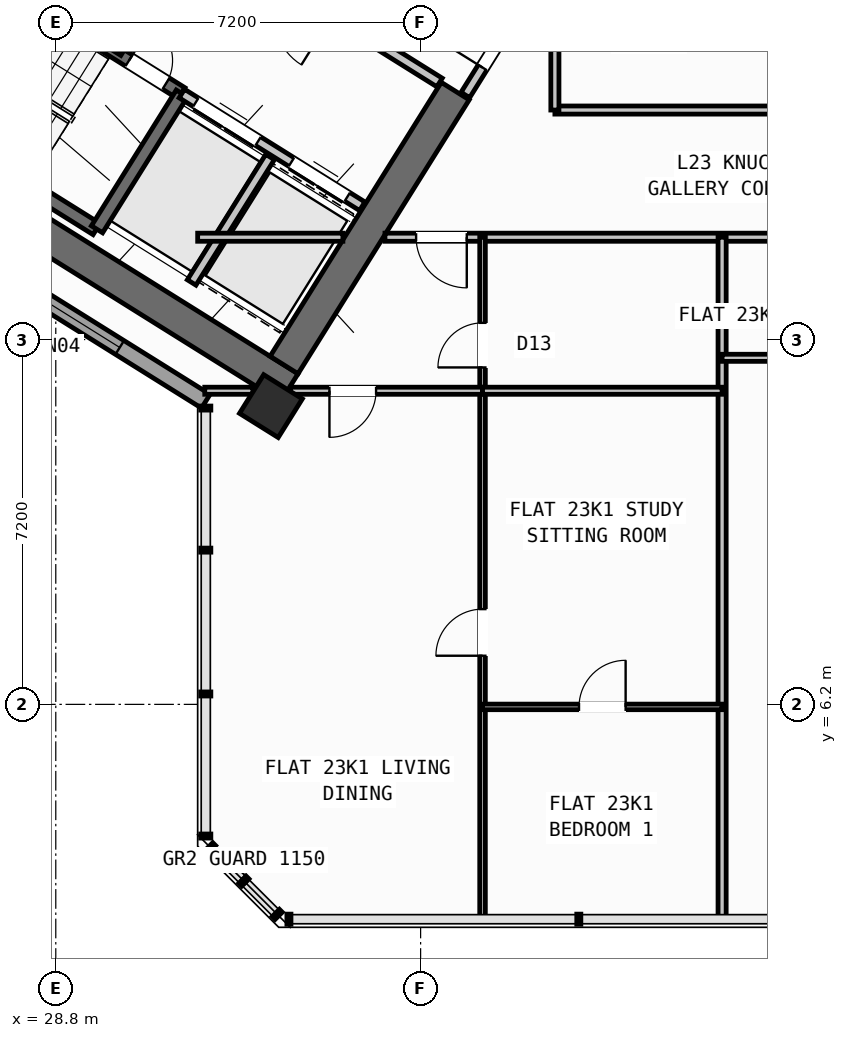
"""IFC4 building model, lengths in metres.
Left out: names, types, materials, properties, quantities, classifications, styles, units other than length and angle.
Written with IfcOpenShell. Run it as: python <this file> out.ifc"""

import sys

from ifc_helpers import new_model, si_unit, direction, frame, frame_2d, origin, origin_2d, place, context, subcontext, project, spatial, rectangle, hollow_rectangle, extrude, source, transform, mapped, element, fill, save


model = new_model("IFC4")
c1 = context("Model", 3, precision=1e-05, world=origin(), true_north=direction((0.0, 1.0)))
c2 = subcontext(c1, "Body", "Model", "MODEL_VIEW")
j1 = project(units=[si_unit("LENGTHUNIT", "METRE"), si_unit("PLANEANGLEUNIT", "RADIAN")], contexts=[c1])
p1 = place(None, origin())
s1 = spatial("IfcSite", under=j1, at=p1, CompositionType="ELEMENT")
p2 = place(p1, origin())
s2 = spatial("IfcBuilding", under=s1, at=p2, CompositionType="ELEMENT")
p3 = place(p2, frame((0.0, 0.0, 93.6)))
s3 = spatial("IfcBuildingStorey", under=s2, at=p3, CompositionType="ELEMENT", Elevation=93.6)
p4 = place(p3, frame((33.409, 12.45, 0.0), z_axis=(0.0, 0.0, 1.0), x_axis=(-0.848051132073, 0.529914405721, 0.0)))
e1 = element("IfcWall", 1, at=p4, inside=s3, PredefinedType="SHEAR", context=c2, shape_type="SweptSolid", body=[
    extrude(rectangle(XDim=13.24, YDim=0.65, at=frame_2d((6.62, 0.0))), origin(), (0.0, 0.0, 1.0), 3.35),
])
p5 = place(p3, frame((36.683, 18.304, 0.0), z_axis=(0.0, 0.0, 1.0), x_axis=(-0.529899109053, -0.848060690178, 0.0)))
e2 = element("IfcWall", 2, at=p5, inside=s3, PredefinedType="SHEAR", context=c2, shape_type="SweptSolid", body=[
    extrude(rectangle(XDim=6.375, YDim=0.65, at=frame_2d((3.188, 0.0))), origin(), (0.0, 0.0, 1.0), 3.35),
])
m1 = source(origin(), c2, "Body", "SweptSolid", [
    extrude(hollow_rectangle(XDim=0.9, YDim=0.9, WallThickness=0.036, at=origin_2d()), origin(), (0.0, 0.0, 1.0), 3.6),
])
p6 = place(p3, frame((33.046, 12.087, 0.0), z_axis=(0.0, 0.0, 1.0), x_axis=(-0.848048096156, 0.529919264233, 0.0)))
e3 = element("IfcColumn", 3, at=p6, inside=s3, PredefinedType="COLUMN", context=c2, shape_type="MappedRepresentation", body=[
    mapped(m1, transform((0.0, 0.0, 0.0), scale=1.0)),
])
p7 = place(p3, frame((31.76, 12.183, 0.0), z_axis=(0.0, 0.0, 1.0), x_axis=(-0.848047074256, 0.529920899612, 0.0)))
e4 = element("IfcWall", 4, at=p7, inside=s3, PredefinedType="STANDARD", context=c2, shape_type="SweptSolid", body=[
    extrude(rectangle(XDim=30.652, YDim=0.32, at=frame_2d((15.326, 0.0))), origin(), (0.0, 0.0, 1.0), 3.35),
])
p8 = place(p7, frame((15.153, 0.0, 0.0)))
e5 = element("IfcOpeningElement", 5, at=p8, cuts=e4, PredefinedType="OPENING", context=c2, shape_type="SweptSolid", body=[
    extrude(rectangle(XDim=1.2, YDim=2.15, at=frame_2d((0.6, 1.075))), frame((0.0, 0.17, 0.0), z_axis=(0.0, -1.0, 0.0), x_axis=(1.0, 0.0, 0.0)), (0.0, 0.0, 1.0), 0.34),
])
p9 = place(p7, frame((2.002, 0.0, 0.8)))
e6 = element("IfcOpeningElement", 6, at=p9, cuts=e4, PredefinedType="OPENING", context=c2, shape_type="SweptSolid", body=[
    extrude(rectangle(XDim=2.1, YDim=1.55, at=frame_2d((1.05, 0.775))), frame((0.0, 0.17, 0.0), z_axis=(0.0, -1.0, 0.0), x_axis=(1.0, 0.0, 0.0)), (0.0, 0.0, 1.0), 0.34),
])
p10 = place(p7, frame((7.206, 0.0, 0.8)))
e7 = element("IfcOpeningElement", 7, at=p10, cuts=e4, PredefinedType="OPENING", context=c2, shape_type="SweptSolid", body=[
    extrude(rectangle(XDim=2.1, YDim=1.55, at=frame_2d((1.05, 0.775))), frame((0.0, 0.17, 0.0), z_axis=(0.0, -1.0, 0.0), x_axis=(1.0, 0.0, 0.0)), (0.0, 0.0, 1.0), 0.34),
])
p11 = place(p7, frame((12.648, 0.0, 1.0)))
e8 = element("IfcOpeningElement", 8, at=p11, cuts=e4, PredefinedType="OPENING", context=c2, shape_type="SweptSolid", body=[
    extrude(rectangle(XDim=0.9, YDim=1.25, at=frame_2d((0.45, 0.625))), frame((0.0, 0.17, 0.0), z_axis=(0.0, -1.0, 0.0), x_axis=(1.0, 0.0, 0.0)), (0.0, 0.0, 1.0), 0.34),
])
p12 = place(p7, frame((27.974, 0.0, 0.95)))
e9 = element("IfcOpeningElement", 9, at=p12, cuts=e4, PredefinedType="OPENING", context=c2, shape_type="SweptSolid", body=[
    extrude(rectangle(XDim=1.2, YDim=1.4, at=frame_2d((0.6, 0.7))), frame((0.0, 0.17, 0.0), z_axis=(0.0, -1.0, 0.0), x_axis=(1.0, 0.0, 0.0)), (0.0, 0.0, 1.0), 0.34),
])
p13 = place(p7, frame((18.347, 0.0, 1.0)))
e10 = element("IfcOpeningElement", 10, at=p13, cuts=e4, PredefinedType="OPENING", context=c2, shape_type="SweptSolid", body=[
    extrude(rectangle(XDim=0.9, YDim=1.25, at=frame_2d((0.45, 0.625))), frame((0.0, 0.17, 0.0), z_axis=(0.0, -1.0, 0.0), x_axis=(1.0, 0.0, 0.0)), (0.0, 0.0, 1.0), 0.34),
])
p14 = place(p7, frame((20.931, 0.0, 1.0)))
e11 = element("IfcOpeningElement", 11, at=p14, cuts=e4, PredefinedType="OPENING", context=c2, shape_type="SweptSolid", body=[
    extrude(rectangle(XDim=0.65, YDim=1.15, at=frame_2d((0.325, 0.575))), frame((0.0, 0.17, 0.0), z_axis=(0.0, -1.0, 0.0), x_axis=(1.0, 0.0, 0.0)), (0.0, 0.0, 1.0), 0.34),
])
p15 = place(p7, frame((22.938, 0.0, 1.0)))
e12 = element("IfcOpeningElement", 12, at=p15, cuts=e4, PredefinedType="OPENING", context=c2, shape_type="SweptSolid", body=[
    extrude(rectangle(XDim=0.9, YDim=1.25, at=frame_2d((0.45, 0.625))), frame((0.0, 0.17, 0.0), z_axis=(0.0, -1.0, 0.0), x_axis=(1.0, 0.0, 0.0)), (0.0, 0.0, 1.0), 0.34),
])
p16 = place(p7, frame((25.069, 0.0, 1.0)))
e13 = element("IfcOpeningElement", 13, at=p16, cuts=e4, PredefinedType="OPENING", context=c2, shape_type="SweptSolid", body=[
    extrude(rectangle(XDim=0.9, YDim=1.25, at=frame_2d((0.45, 0.625))), frame((0.0, 0.17, 0.0), z_axis=(0.0, -1.0, 0.0), x_axis=(1.0, 0.0, 0.0)), (0.0, 0.0, 1.0), 0.34),
])
p17 = place(p3, frame((29.605, 15.581, 0.0), z_axis=(0.0, 0.0, 1.0), x_axis=(-0.848036911448, 0.529937163087, 0.0)))
e14 = element("IfcWall", 14, at=p17, inside=s3, PredefinedType="SHEAR", context=c2, shape_type="SweptSolid", body=[
    extrude(rectangle(XDim=7.46, YDim=0.26, at=frame_2d((3.73, 0.0))), origin(), (0.0, 0.0, 1.0), 3.35),
])
p18 = place(p3, frame((31.28, 18.261, 0.0), z_axis=(0.0, 0.0, 1.0), x_axis=(-0.848051618787, 0.529913626805, 0.0)))
e15 = element("IfcWall", 15, at=p18, inside=s3, PredefinedType="SHEAR", context=c2, shape_type="SweptSolid", body=[
    extrude(rectangle(XDim=7.46, YDim=0.26, at=frame_2d((3.73, 0.0))), origin(), (0.0, 0.0, 1.0), 3.35),
])
p19 = place(p18, frame((0.36, 0.0, 0.0)))
e16 = element("IfcOpeningElement", 16, at=p19, cuts=e15, PredefinedType="OPENING", context=c2, shape_type="SweptSolid", body=[
    extrude(rectangle(XDim=0.86, YDim=2.05, at=frame_2d((0.43, 1.025))), frame((0.0, 0.14, 0.0), z_axis=(0.0, -1.0, 0.0), x_axis=(1.0, 0.0, 0.0)), (0.0, 0.0, 1.0), 0.28),
])
p20 = place(p3, frame((31.288, 18.256, 0.0), z_axis=(0.0, 0.0, 1.0), x_axis=(-0.529943379326, -0.848033026897, 0.0)))
e17 = element("IfcWall", 17, at=p20, inside=s3, PredefinedType="SHEAR", context=c2, shape_type="SweptSolid", body=[
    extrude(rectangle(XDim=3.16, YDim=0.26, at=frame_2d((1.58, 0.0))), origin(), (0.0, 0.0, 1.0), 3.35),
])
p21 = place(p3, frame((34.848, 16.031, 0.0), z_axis=(0.0, 0.0, 1.0), x_axis=(-0.848044042236, 0.529925751807, 0.0)))
e18 = element("IfcWall", 18, at=p21, inside=s3, PredefinedType="STANDARD", context=c2, shape_type="SweptSolid", body=[
    extrude(rectangle(XDim=4.198, YDim=0.2, at=frame_2d((2.099, 0.0))), origin(), (0.0, 0.0, 1.0), 3.34),
])
p22 = place(p21, frame((0.348, 0.0, 0.0)))
e19 = element("IfcOpeningElement", 19, at=p22, cuts=e18, PredefinedType="OPENING", context=c2, shape_type="SweptSolid", body=[
    extrude(rectangle(XDim=1.3, YDim=2.2, at=frame_2d((0.65, 1.1))), frame((0.0, 0.11, 0.0), z_axis=(0.0, -1.0, 0.0), x_axis=(1.0, 0.0, 0.0)), (0.0, 0.0, 1.0), 0.22),
])
p23 = place(p21, frame((2.423, 0.0, 0.0)))
e20 = element("IfcOpeningElement", 20, at=p23, cuts=e18, PredefinedType="OPENING", context=c2, shape_type="SweptSolid", body=[
    extrude(rectangle(XDim=1.45, YDim=2.25, at=frame_2d((0.725, 1.125))), frame((0.0, 0.11, 0.0), z_axis=(0.0, -1.0, 0.0), x_axis=(1.0, 0.0, 0.0)), (0.0, 0.0, 1.0), 0.22),
])
p24 = place(p3, frame((36.374, 18.474, 0.0), z_axis=(0.0, 0.0, 1.0), x_axis=(-0.848051071577, 0.529914502535, 0.0)))
e21 = element("IfcWall", 21, at=p24, inside=s3, PredefinedType="STANDARD", context=c2, shape_type="SweptSolid", body=[
    extrude(rectangle(XDim=5.718, YDim=0.2, at=frame_2d((2.859, 0.0))), origin(), (0.0, 0.0, 1.0), 3.34),
])
p25 = place(p24, frame((2.498, 0.0, 0.0)))
e22 = element("IfcOpeningElement", 22, at=p25, cuts=e21, PredefinedType="OPENING", context=c2, shape_type="SweptSolid", body=[
    extrude(rectangle(XDim=1.15, YDim=2.1, at=frame_2d((0.575, 1.05))), frame((0.0, 0.11, 0.0), z_axis=(0.0, -1.0, 0.0), x_axis=(1.0, 0.0, 0.0)), (0.0, 0.0, 1.0), 0.22),
])
p26 = place(p3, frame((33.029, 17.003, 0.0), z_axis=(0.0, 0.0, 1.0), x_axis=(-0.529916267533, -0.848049968695, 0.0)))
e23 = element("IfcWall", 23, at=p26, inside=s3, PredefinedType="STANDARD", context=c2, shape_type="SweptSolid", body=[
    extrude(rectangle(XDim=2.92, YDim=0.2, at=frame_2d((1.46, 0.0))), origin(), (0.0, 0.0, 1.0), 3.34),
])
p27 = place(p3, frame((31.525, 21.504, 0.0), z_axis=(0.0, 0.0, 1.0), x_axis=(-0.529907497854, -0.848055448493, 0.0)))
e24 = element("IfcWall", 24, at=p27, inside=s3, PredefinedType="STANDARD", context=c2, shape_type="SweptSolid", body=[
    extrude(rectangle(XDim=2.88, YDim=0.2, at=frame_2d((1.44, 0.0))), origin(), (0.0, 0.0, 1.0), 3.34),
])
p28 = place(p3, frame((38.451, 20.737, 0.0), z_axis=(0.0, 0.0, 1.0), x_axis=(-0.529924799939, -0.848044637038, 0.0)))
e25 = element("IfcWall", 25, at=p28, inside=s3, PredefinedType="STANDARD", context=c2, shape_type="SweptSolid", body=[
    extrude(rectangle(XDim=2.96, YDim=0.2, at=frame_2d((1.48, 0.0))), origin(), (0.0, 0.0, 1.0), 3.34),
])
p29 = place(p28, frame((1.46, 0.0, 0.0)))
e26 = element("IfcOpeningElement", 26, at=p29, cuts=e25, PredefinedType="OPENING", context=c2, shape_type="SweptSolid", body=[
    extrude(rectangle(XDim=0.86, YDim=2.05, at=frame_2d((0.43, 1.025))), frame((0.0, 0.11, 0.0), z_axis=(0.0, -1.0, 0.0), x_axis=(1.0, 0.0, 0.0)), (0.0, 0.0, 1.0), 0.22),
])
p30 = place(p3, frame((31.6, 15.42, 0.0), z_axis=(0.0, 0.0, 1.0), x_axis=(1.0, 0.0, 0.0)))
e27 = element("IfcWall", 27, at=p30, inside=s3, PredefinedType="PARTITIONING", context=c2, shape_type="SweptSolid", body=[
    extrude(rectangle(XDim=2.866, YDim=0.16, at=frame_2d((1.433, 0.0))), origin(), (0.0, 0.0, 1.0), 3.34),
])
p31 = place(p3, frame((35.296, 15.42, 0.0), z_axis=(0.0, 0.0, 1.0), x_axis=(1.0, 0.0, 0.0)))
e28 = element("IfcWall", 28, at=p31, inside=s3, PredefinedType="PARTITIONING", context=c2, shape_type="SweptSolid", body=[
    extrude(rectangle(XDim=15.311, YDim=0.16, at=frame_2d((7.655, 0.0))), origin(), (0.0, 0.0, 1.0), 3.34),
])
p32 = place(p31, frame((0.615, 0.0, 0.0)))
e29 = element("IfcOpeningElement", 29, at=p32, cuts=e28, PredefinedType="OPENING", context=c2, shape_type="SweptSolid", body=[
    extrude(rectangle(XDim=1.0, YDim=2.1, at=frame_2d((0.5, 1.05))), frame((0.0, 0.09, 0.0), z_axis=(0.0, -1.0, 0.0), x_axis=(1.0, 0.0, 0.0)), (0.0, 0.0, 1.0), 0.18),
])
p33 = place(p31, frame((9.035, 0.0, 0.0)))
e30 = element("IfcOpeningElement", 30, at=p33, cuts=e28, PredefinedType="OPENING", context=c2, shape_type="SweptSolid", body=[
    extrude(rectangle(XDim=1.0, YDim=2.1, at=frame_2d((0.5, 1.05))), frame((0.0, 0.09, 0.0), z_axis=(0.0, -1.0, 0.0), x_axis=(1.0, 0.0, 0.0)), (0.0, 0.0, 1.0), 0.18),
])
p34 = place(p3, frame((38.65, 17.93, 0.0), z_axis=(0.0, 0.0, 1.0), x_axis=(1.0, 0.0, 0.0)))
e31 = element("IfcWall", 31, at=p34, inside=s3, PredefinedType="PARTITIONING", context=c2, shape_type="SweptSolid", body=[
    extrude(rectangle(XDim=9.95, YDim=0.16, at=frame_2d((4.975, 0.0))), origin(), (0.0, 0.0, 1.0), 3.34),
])
p35 = place(p34, frame((4.475, 0.0, 0.0)))
e32 = element("IfcOpeningElement", 32, at=p35, cuts=e31, PredefinedType="OPENING", context=c2, shape_type="SweptSolid", body=[
    extrude(rectangle(XDim=1.0, YDim=2.1, at=frame_2d((0.5, 1.05))), frame((0.0, 0.09, 0.0), z_axis=(0.0, -1.0, 0.0), x_axis=(1.0, 0.0, 0.0)), (0.0, 0.0, 1.0), 0.18),
])
p36 = place(p3, frame((38.65, 17.93, 0.0), z_axis=(0.0, 0.0, 1.0), x_axis=(0.0, 1.0, 0.0)))
e33 = element("IfcWall", 33, at=p36, inside=s3, PredefinedType="PARTITIONING", context=c2, shape_type="SweptSolid", body=[
    extrude(rectangle(XDim=2.857, YDim=0.16, at=frame_2d((1.428, 0.0))), origin(), (0.0, 0.0, 1.0), 3.34),
])
p37 = place(p3, frame((41.95, 1.96, 0.0), z_axis=(0.0, 0.0, 1.0), x_axis=(0.0, 1.0, 0.0)))
e34 = element("IfcWall", 34, at=p37, inside=s3, PredefinedType="PARTITIONING", context=c2, shape_type="SweptSolid", body=[
    extrude(rectangle(XDim=13.46, YDim=0.16, at=frame_2d((6.73, 0.0))), origin(), (0.0, 0.0, 1.0), 3.34),
])
p38 = place(p3, frame((37.222, 1.96, 0.0), z_axis=(0.0, 0.0, 1.0), x_axis=(0.0, 1.0, 0.0)))
e35 = element("IfcWall", 35, at=p38, inside=s3, PredefinedType="PARTITIONING", context=c2, shape_type="SweptSolid", body=[
    extrude(rectangle(XDim=13.46, YDim=0.11, at=frame_2d((6.73, 0.0))), origin(), (0.0, 0.0, 1.0), 3.34),
])
p39 = place(p38, frame((5.2, 0.0, 0.0)))
e36 = element("IfcOpeningElement", 36, at=p39, cuts=e35, PredefinedType="OPENING", context=c2, shape_type="SweptSolid", body=[
    extrude(rectangle(XDim=0.92, YDim=2.08, at=frame_2d((0.46, 1.04))), frame((0.0, 0.065, 0.0), z_axis=(0.0, -1.0, 0.0), x_axis=(1.0, 0.0, 0.0)), (0.0, 0.0, 1.0), 0.13),
])
p40 = place(p38, frame((10.89, 0.0, 0.0)))
e37 = element("IfcOpeningElement", 37, at=p40, cuts=e35, PredefinedType="OPENING", context=c2, shape_type="SweptSolid", body=[
    extrude(rectangle(XDim=0.88, YDim=2.08, at=frame_2d((0.44, 1.04))), frame((0.0, 0.065, 0.0), z_axis=(0.0, -1.0, 0.0), x_axis=(1.0, 0.0, 0.0)), (0.0, 0.0, 1.0), 0.13),
])
p41 = place(p3, frame((31.74, 12.39, 0.0), z_axis=(0.0, 0.0, 1.0), x_axis=(1.0, 0.0, 0.0)))
e38 = element("IfcWall", 38, at=p41, inside=s3, PredefinedType="PLUMBINGWALL", context=c2, shape_type="SweptSolid", body=[
    extrude(rectangle(XDim=0.951, YDim=0.14, at=frame_2d((0.475, 0.0))), origin(), (0.0, 0.0, 1.0), 3.34),
])
p42 = place(p3, frame((33.433, 12.39, 0.0), z_axis=(0.0, 0.0, 1.0), x_axis=(1.0, 0.0, 0.0)))
e39 = element("IfcWall", 39, at=p42, inside=s3, PredefinedType="PLUMBINGWALL", context=c2, shape_type="SweptSolid", body=[
    extrude(rectangle(XDim=3.789, YDim=0.14, at=frame_2d((1.895, 0.0))), origin(), (0.0, 0.0, 1.0), 2.525),
])
p43 = place(p42, frame((0.768, 0.0, 0.0)))
e40 = element("IfcOpeningElement", 40, at=p43, cuts=e39, PredefinedType="OPENING", context=c2, shape_type="SweptSolid", body=[
    extrude(rectangle(XDim=0.92, YDim=2.08, at=frame_2d((0.46, 1.04))), frame((0.0, 0.08, 0.0), z_axis=(0.0, -1.0, 0.0), x_axis=(1.0, 0.0, 0.0)), (0.0, 0.0, 1.0), 0.16),
])
p44 = place(p3, frame((37.222, 12.39, 0.0), z_axis=(0.0, 0.0, 1.0), x_axis=(1.0, 0.0, 0.0)))
e41 = element("IfcWall", 41, at=p44, inside=s3, PredefinedType="PLUMBINGWALL", context=c2, shape_type="SweptSolid", body=[
    extrude(rectangle(XDim=4.728, YDim=0.14, at=frame_2d((2.364, 0.0))), origin(), (0.0, 0.0, 1.0), 2.525),
])
p45 = place(p3, frame((37.222, 6.15, 0.0), z_axis=(0.0, 0.0, 1.0), x_axis=(1.0, 0.0, 0.0)))
e42 = element("IfcWall", 42, at=p45, inside=s3, PredefinedType="PARTITIONING", context=c2, shape_type="SweptSolid", body=[
    extrude(rectangle(XDim=4.728, YDim=0.11, at=frame_2d((2.364, 0.0))), origin(), (0.0, 0.0, 1.0), 3.34),
])
p46 = place(p45, frame((1.904, 0.0, 0.0)))
e43 = element("IfcOpeningElement", 43, at=p46, cuts=e42, PredefinedType="OPENING", context=c2, shape_type="SweptSolid", body=[
    extrude(rectangle(XDim=0.92, YDim=2.08, at=frame_2d((0.46, 1.04))), frame((0.0, 0.065, 0.0), z_axis=(0.0, -1.0, 0.0), x_axis=(1.0, 0.0, 0.0)), (0.0, 0.0, 1.0), 0.13),
])
p47 = place(p3, frame((41.95, 13.04, 0.0), z_axis=(0.0, 0.0, 1.0), x_axis=(1.0, 0.0, 0.0)))
e44 = element("IfcWall", 44, at=p47, inside=s3, PredefinedType="PLUMBINGWALL", context=c2, shape_type="SweptSolid", body=[
    extrude(rectangle(XDim=5.713, YDim=0.14, at=frame_2d((2.856, 0.0))), origin(), (0.0, 0.0, 1.0), 3.34),
])
p48 = place(p47, frame((2.396, 0.0, 0.0)))
e45 = element("IfcOpeningElement", 45, at=p48, cuts=e44, PredefinedType="OPENING", context=c2, shape_type="SweptSolid", body=[
    extrude(rectangle(XDim=0.92, YDim=2.08, at=frame_2d((0.46, 1.04))), frame((0.0, 0.08, 0.0), z_axis=(0.0, -1.0, 0.0), x_axis=(1.0, 0.0, 0.0)), (0.0, 0.0, 1.0), 0.16),
])
m2 = source(origin(), c2, "Body", "SweptSolid", [
    extrude(rectangle(XDim=2.1, YDim=1.55, at=frame_2d((1.05, 0.775))), frame((0.0, 0.03, 0.0), z_axis=(0.0, -1.0, 0.0), x_axis=(1.0, 0.0, 0.0)), (0.0, 0.0, 1.0), 0.06),
])
p49 = place(p9, origin())
e46 = element("IfcWindow", 46, at=p49, inside=s3, PartitioningType="SINGLE_PANEL", PredefinedType="WINDOW", context=c2, shape_type="MappedRepresentation", body=[
    mapped(m2, transform((0.0, 0.0, 0.0), scale=1.0)),
])
fill(e6, e46)
m3 = source(origin(), c2, "Body", "SweptSolid", [
    extrude(rectangle(XDim=0.86, YDim=2.05, at=frame_2d((0.43, 1.025))), frame((0.0, 0.025, 0.0), z_axis=(0.0, -1.0, 0.0), x_axis=(1.0, 0.0, 0.0)), (0.0, 0.0, 1.0), 0.05),
])
p50 = place(p19, frame((0.86, 0.0, 0.0), z_axis=(0.0, 0.0, 1.0), x_axis=(-1.0, 0.0, 0.0)))
e47 = element("IfcDoor", 47, at=p50, inside=s3, OperationType="SINGLE_SWING_LEFT", PredefinedType="DOOR", context=c2, shape_type="MappedRepresentation", body=[
    mapped(m3, transform((0.0, 0.0, 0.0), scale=1.0)),
])
fill(e16, e47)
m4 = source(origin(), c2, "Body", "SweptSolid", [
    extrude(rectangle(XDim=1.3, YDim=2.2, at=frame_2d((0.65, 1.1))), frame((0.0, 0.025, 0.0), z_axis=(0.0, -1.0, 0.0), x_axis=(1.0, 0.0, 0.0)), (0.0, 0.0, 1.0), 0.05),
])
p51 = place(p22, origin())
e48 = element("IfcDoor", 48, at=p51, inside=s3, OperationType="DOUBLE_DOOR_SLIDING", PredefinedType="DOOR", context=c2, shape_type="MappedRepresentation", body=[
    mapped(m4, transform((0.0, 0.0, 0.0), scale=1.0)),
])
fill(e19, e48)
m5 = source(origin(), c2, "Body", "SweptSolid", [
    extrude(rectangle(XDim=1.45, YDim=2.25, at=frame_2d((0.725, 1.125))), frame((0.0, 0.025, 0.0), z_axis=(0.0, -1.0, 0.0), x_axis=(1.0, 0.0, 0.0)), (0.0, 0.0, 1.0), 0.05),
])
p52 = place(p23, origin())
e49 = element("IfcDoor", 49, at=p52, inside=s3, OperationType="DOUBLE_DOOR_SLIDING", PredefinedType="DOOR", context=c2, shape_type="MappedRepresentation", body=[
    mapped(m5, transform((0.0, 0.0, 0.0), scale=1.0)),
])
fill(e20, e49)
p53 = place(p29, frame((0.86, 0.0, 0.0), z_axis=(0.0, 0.0, 1.0), x_axis=(-1.0, 0.0, 0.0)))
e50 = element("IfcDoor", 50, at=p53, inside=s3, OperationType="SINGLE_SWING_LEFT", PredefinedType="DOOR", context=c2, shape_type="MappedRepresentation", body=[
    mapped(m3, transform((0.0, 0.0, 0.0), scale=1.0)),
])
fill(e26, e50)
m6 = source(origin(), c2, "Body", "SweptSolid", [
    extrude(rectangle(XDim=0.92, YDim=2.08, at=frame_2d((0.46, 1.04))), frame((0.0, 0.025, 0.0), z_axis=(0.0, -1.0, 0.0), x_axis=(1.0, 0.0, 0.0)), (0.0, 0.0, 1.0), 0.05),
])
p54 = place(p39, origin())
e51 = element("IfcDoor", 51, at=p54, inside=s3, OperationType="SINGLE_SWING_LEFT", PredefinedType="DOOR", context=c2, shape_type="MappedRepresentation", body=[
    mapped(m6, transform((0.0, 0.0, 0.0), scale=1.0)),
])
fill(e36, e51)
p55 = place(p46, origin())
e52 = element("IfcDoor", 52, at=p55, inside=s3, OperationType="SINGLE_SWING_RIGHT", PredefinedType="DOOR", context=c2, shape_type="MappedRepresentation", body=[
    mapped(m6, transform((0.0, 0.0, 0.0), scale=1.0)),
])
fill(e43, e52)
m7 = source(origin(), c2, "Body", "SweptSolid", [
    extrude(rectangle(XDim=1.0, YDim=2.1, at=frame_2d((0.5, 1.05))), frame((0.0, 0.025, 0.0), z_axis=(0.0, -1.0, 0.0), x_axis=(1.0, 0.0, 0.0)), (0.0, 0.0, 1.0), 0.05),
])
p56 = place(p32, frame((1.0, 0.0, 0.0), z_axis=(0.0, 0.0, 1.0), x_axis=(-1.0, 0.0, 0.0)))
e53 = element("IfcDoor", 53, at=p56, inside=s3, OperationType="SINGLE_SWING_LEFT", PredefinedType="DOOR", context=c2, shape_type="MappedRepresentation", body=[
    mapped(m7, transform((0.0, 0.0, 0.0), scale=1.0)),
])
fill(e29, e53)
p57 = place(p43, frame((0.92, 0.0, 0.0), z_axis=(0.0, 0.0, 1.0), x_axis=(-1.0, 0.0, 0.0)))
e54 = element("IfcDoor", 54, at=p57, inside=s3, OperationType="SINGLE_SWING_RIGHT", PredefinedType="DOOR", context=c2, shape_type="MappedRepresentation", body=[
    mapped(m6, transform((0.0, 0.0, 0.0), scale=1.0)),
])
fill(e40, e54)
m8 = source(origin(), c2, "Body", "SweptSolid", [
    extrude(rectangle(XDim=0.88, YDim=2.08, at=frame_2d((0.44, 1.04))), frame((0.0, 0.025, 0.0), z_axis=(0.0, -1.0, 0.0), x_axis=(1.0, 0.0, 0.0)), (0.0, 0.0, 1.0), 0.05),
])
p58 = place(p40, origin())
e55 = element("IfcDoor", 55, at=p58, inside=s3, OperationType="SINGLE_SWING_LEFT", PredefinedType="DOOR", context=c2, shape_type="MappedRepresentation", body=[
    mapped(m8, transform((0.0, 0.0, 0.0), scale=1.0)),
])
fill(e37, e55)
save(model, sys.argv[1])
